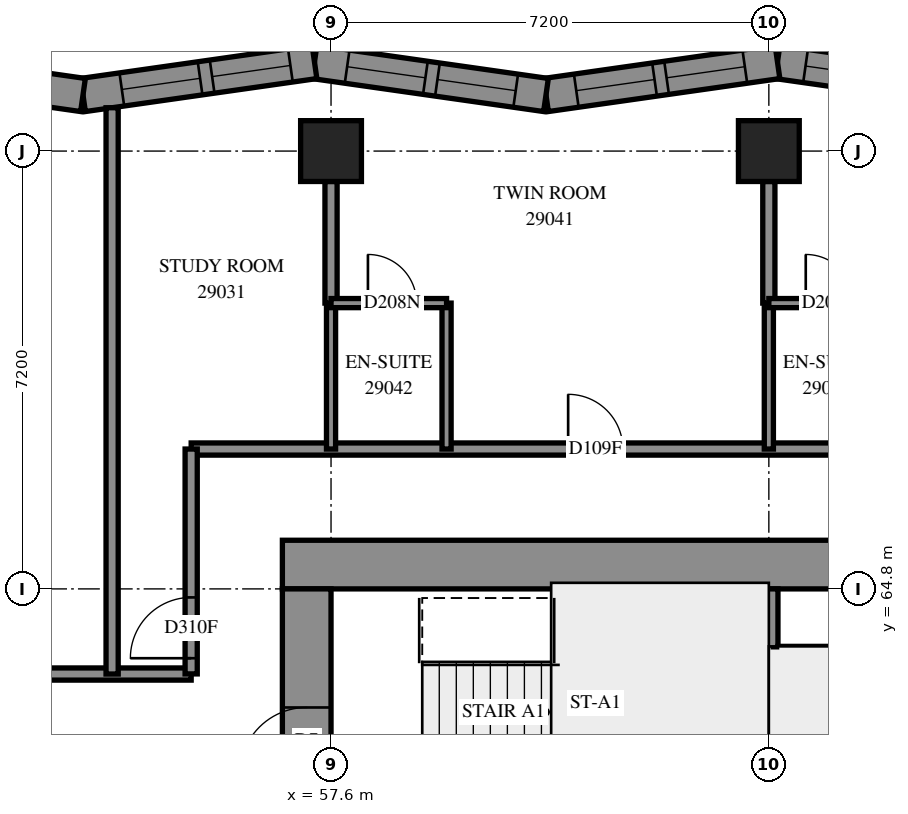
"""IFC4 building model, lengths in metres.
Left out: names, types, materials, properties, quantities, classifications, styles, units other than length and angle.
Written with IfcOpenShell. Run it as: python <this file> out.ifc"""

import sys

from ifc_helpers import new_model, si_unit, direction, frame, frame_2d, origin, origin_2d, place, context, subcontext, project, spatial, polyline, rectangle, outline, extrude, element, fill, save


model = new_model("IFC4")
c1 = context("Model", 3, precision=1e-05, world=origin(), true_north=direction((0.0, 1.0)))
c2 = subcontext(c1, "Body", "Model", "MODEL_VIEW")
j1 = project(units=[si_unit("LENGTHUNIT", "METRE"), si_unit("PLANEANGLEUNIT", "RADIAN")], contexts=[c1])
p1 = place(None, origin())
s1 = spatial("IfcSite", under=j1, at=p1, CompositionType="ELEMENT")
p2 = place(p1, origin())
s2 = spatial("IfcBuilding", under=s1, at=p2, CompositionType="ELEMENT")
p3 = place(p2, frame((0.0, 0.0, 108.4)))
s3 = spatial("IfcBuildingStorey", under=s2, at=p3, CompositionType="ELEMENT", Elevation=108.4)
for number, where, z_axis, x_axis in (
    (1, (57.6, 72.0, 0.0), (0.0, 0.0, 1.0), (1.0, 0.0, 0.0)),
    (2, (64.8, 72.0, 0.0), (0.0, 0.0, 1.0), (1.0, 0.0, 0.0)),
):
    element("IfcColumn", number, at=place(p3, frame(where, z_axis=z_axis, x_axis=x_axis)), inside=s3, PredefinedType="COLUMN", context=c2, shape_type="SweptSolid", body=[
        extrude(rectangle(XDim=1.0, YDim=1.0, at=origin_2d()), origin(), (0.0, 0.0, 1.0), 3.1),
    ])
p4 = place(p3, frame((56.8, 65.2, -0.3), z_axis=(0.0, 0.0, 1.0), x_axis=(1.0, 0.0, 0.0)))
e3 = element("IfcWall", 3, at=p4, inside=s3, PredefinedType="SHEAR", context=c2, shape_type="SweptSolid", body=[
    extrude(rectangle(XDim=16.0, YDim=0.8, at=frame_2d((8.0, 0.0))), origin(), (0.0, 0.0, 1.0), 2.7),
])
p5 = place(p4, frame((10.8, 0.0, 0.3)))
e4 = element("IfcOpeningElement", 4, at=p5, cuts=e3, PredefinedType="OPENING", context=c2, shape_type="SweptSolid", body=[
    extrude(rectangle(XDim=0.8, YDim=2.1, at=frame_2d((0.4, 1.05))), frame((0.0, 0.41, 0.0), z_axis=(0.0, -1.0, 0.0), x_axis=(1.0, 0.0, 0.0)), (0.0, 0.0, 1.0), 0.82),
])
p6 = place(p3, frame((57.2, 50.4, -0.3), z_axis=(0.0, 0.0, 1.0), x_axis=(0.0, 1.0, 0.0)))
e5 = element("IfcWall", 5, at=p6, inside=s3, PredefinedType="SHEAR", context=c2, shape_type="SweptSolid", body=[
    extrude(rectangle(XDim=14.4, YDim=0.8, at=frame_2d((7.2, 0.0))), origin(), (0.0, 0.0, 1.0), 2.7),
])
p7 = place(p6, frame((4.55, 0.0, 0.3)))
e6 = element("IfcOpeningElement", 6, at=p7, cuts=e5, PredefinedType="OPENING", context=c2, shape_type="SweptSolid", body=[
    extrude(rectangle(XDim=1.1, YDim=2.1, at=frame_2d((0.55, 1.05))), frame((0.0, 0.41, 0.0), z_axis=(0.0, -1.0, 0.0), x_axis=(1.0, 0.0, 0.0)), (0.0, 0.0, 1.0), 0.82),
])
p8 = place(p6, frame((11.35, 0.0, 0.3)))
e7 = element("IfcOpeningElement", 7, at=p8, cuts=e5, PredefinedType="OPENING", context=c2, shape_type="SweptSolid", body=[
    extrude(rectangle(XDim=1.1, YDim=2.1, at=frame_2d((0.55, 1.05))), frame((0.0, 0.41, 0.0), z_axis=(0.0, -1.0, 0.0), x_axis=(1.0, 0.0, 0.0)), (0.0, 0.0, 1.0), 0.82),
])
p9 = place(p3, frame((64.8, 60.6, 0.0), z_axis=(0.0, 0.0, 1.0), x_axis=(0.0, 1.0, 0.0)))
e8 = element("IfcWall", 8, at=p9, inside=s3, PredefinedType="SOLIDWALL", context=c2, shape_type="SweptSolid", body=[
    extrude(rectangle(XDim=4.2, YDim=0.3, at=frame_2d((2.1, 0.0))), origin(), (0.0, 0.0, 1.0), 3.1),
])
p10 = place(p3, frame((68.749, 72.922, 0.0), z_axis=(0.0, 0.0, 1.0), x_axis=(-0.990016994, 0.1409480459, 0.0)))
e9 = element("IfcWall", 9, at=p10, inside=s3, PredefinedType="SOLIDWALL", context=c2, shape_type="SweptSolid", body=[
    extrude(outline(polyline([(0.039, -0.275), (3.885, -0.275), (3.806, 0.275), (-0.039, 0.275), (0.039, -0.275)])), origin(), (0.0, 0.0, 1.0), 3.1),
])
p11 = place(p10, frame((0.579, 0.0, 0.5)))
e10 = element("IfcOpeningElement", 10, at=p11, cuts=e9, PredefinedType="OPENING", context=c2, shape_type="SweptSolid", body=[
    extrude(rectangle(XDim=1.3, YDim=2.45, at=frame_2d((0.65, 1.225))), frame((0.0, 0.285, 0.0), z_axis=(0.0, -1.0, 0.0), x_axis=(1.0, 0.0, 0.0)), (0.0, 0.0, 1.0), 0.57),
])
p12 = place(p10, frame((2.079, 0.0, 0.5)))
e11 = element("IfcOpeningElement", 11, at=p12, cuts=e9, PredefinedType="OPENING", context=c2, shape_type="SweptSolid", body=[
    extrude(rectangle(XDim=1.3, YDim=2.45, at=frame_2d((0.65, 1.225))), frame((0.0, 0.285, 0.0), z_axis=(0.0, -1.0, 0.0), x_axis=(1.0, 0.0, 0.0)), (0.0, 0.0, 1.0), 0.57),
])
p13 = place(p3, frame((64.942, 73.464, 0.0), z_axis=(0.0, 0.0, 1.0), x_axis=(-0.990016994, -0.1409480459, 0.0)))
e12 = element("IfcWall", 12, at=p13, inside=s3, PredefinedType="SOLIDWALL", context=c2, shape_type="SweptSolid", body=[
    extrude(outline(polyline([(-0.039, -0.275), (3.806, -0.275), (3.885, 0.275), (0.039, 0.275), (-0.039, -0.275)])), origin(), (0.0, 0.0, 1.0), 3.1),
])
p14 = place(p13, frame((0.542, 0.0, 0.5)))
e13 = element("IfcOpeningElement", 13, at=p14, cuts=e12, PredefinedType="OPENING", context=c2, shape_type="SweptSolid", body=[
    extrude(rectangle(XDim=1.3, YDim=2.45, at=frame_2d((0.65, 1.225))), frame((0.0, 0.285, 0.0), z_axis=(0.0, -1.0, 0.0), x_axis=(1.0, 0.0, 0.0)), (0.0, 0.0, 1.0), 0.57),
])
p15 = place(p13, frame((2.042, 0.0, 0.5)))
e14 = element("IfcOpeningElement", 14, at=p15, cuts=e12, PredefinedType="OPENING", context=c2, shape_type="SweptSolid", body=[
    extrude(rectangle(XDim=1.3, YDim=2.45, at=frame_2d((0.65, 1.225))), frame((0.0, 0.285, 0.0), z_axis=(0.0, -1.0, 0.0), x_axis=(1.0, 0.0, 0.0)), (0.0, 0.0, 1.0), 0.57),
])
p16 = place(p3, frame((61.135, 72.922, 0.0), z_axis=(0.0, 0.0, 1.0), x_axis=(-0.990016994, 0.1409480459, 0.0)))
e15 = element("IfcWall", 15, at=p16, inside=s3, PredefinedType="SOLIDWALL", context=c2, shape_type="SweptSolid", body=[
    extrude(outline(polyline([(0.039, -0.275), (3.885, -0.275), (3.806, 0.275), (-0.039, 0.275), (0.039, -0.275)])), origin(), (0.0, 0.0, 1.0), 3.1),
])
p17 = place(p16, frame((0.503, 0.0, 0.5)))
e16 = element("IfcOpeningElement", 16, at=p17, cuts=e15, PredefinedType="OPENING", context=c2, shape_type="SweptSolid", body=[
    extrude(rectangle(XDim=1.3, YDim=2.45, at=frame_2d((0.65, 1.225))), frame((0.0, 0.285, 0.0), z_axis=(0.0, -1.0, 0.0), x_axis=(1.0, 0.0, 0.0)), (0.0, 0.0, 1.0), 0.57),
])
p18 = place(p16, frame((2.003, 0.0, 0.5)))
e17 = element("IfcOpeningElement", 17, at=p18, cuts=e15, PredefinedType="OPENING", context=c2, shape_type="SweptSolid", body=[
    extrude(rectangle(XDim=1.3, YDim=2.45, at=frame_2d((0.65, 1.225))), frame((0.0, 0.285, 0.0), z_axis=(0.0, -1.0, 0.0), x_axis=(1.0, 0.0, 0.0)), (0.0, 0.0, 1.0), 0.57),
])
p19 = place(p3, frame((57.328, 73.464, 0.0), z_axis=(0.0, 0.0, 1.0), x_axis=(-0.990016994, -0.1409480459, 0.0)))
e18 = element("IfcWall", 18, at=p19, inside=s3, PredefinedType="SOLIDWALL", context=c2, shape_type="SweptSolid", body=[
    extrude(outline(polyline([(-0.039, -0.275), (3.806, -0.275), (3.885, 0.275), (0.039, 0.275), (-0.039, -0.275)])), origin(), (0.0, 0.0, 1.0), 3.1),
])
p20 = place(p19, frame((0.4, 0.0, 0.5)))
e19 = element("IfcOpeningElement", 19, at=p20, cuts=e18, PredefinedType="OPENING", context=c2, shape_type="SweptSolid", body=[
    extrude(rectangle(XDim=1.3, YDim=2.45, at=frame_2d((0.65, 1.225))), frame((0.0, 0.285, 0.0), z_axis=(0.0, -1.0, 0.0), x_axis=(1.0, 0.0, 0.0)), (0.0, 0.0, 1.0), 0.57),
])
p21 = place(p19, frame((1.9, 0.0, 0.5)))
e20 = element("IfcOpeningElement", 20, at=p21, cuts=e18, PredefinedType="OPENING", context=c2, shape_type="SweptSolid", body=[
    extrude(rectangle(XDim=1.3, YDim=2.45, at=frame_2d((0.65, 1.225))), frame((0.0, 0.285, 0.0), z_axis=(0.0, -1.0, 0.0), x_axis=(1.0, 0.0, 0.0)), (0.0, 0.0, 1.0), 0.57),
])
p22 = place(p3, frame((53.521, 72.922, 0.0), z_axis=(0.0, 0.0, 1.0), x_axis=(-0.990016994, 0.1409480459, 0.0)))
e21 = element("IfcWall", 21, at=p22, inside=s3, PredefinedType="SOLIDWALL", context=c2, shape_type="SweptSolid", body=[
    extrude(outline(polyline([(0.039, -0.275), (3.885, -0.275), (3.806, 0.275), (-0.039, 0.275), (0.039, -0.275)])), origin(), (0.0, 0.0, 1.0), 3.1),
])
p23 = place(p22, frame((1.076, 0.0, 0.5)))
e22 = element("IfcOpeningElement", 22, at=p23, cuts=e21, PredefinedType="OPENING", context=c2, shape_type="SweptSolid", body=[
    extrude(rectangle(XDim=1.2, YDim=2.45, at=frame_2d((0.6, 1.225))), frame((0.0, 0.285, 0.0), z_axis=(0.0, -1.0, 0.0), x_axis=(1.0, 0.0, 0.0)), (0.0, 0.0, 1.0), 0.57),
])
p24 = place(p3, frame((64.95, 63.78, 0.0), z_axis=(0.0, 0.0, 1.0), x_axis=(1.0, 0.0, 0.0)))
e23 = element("IfcWall", 23, at=p24, inside=s3, PredefinedType="PARTITIONING", context=c2, shape_type="SweptSolid", body=[
    extrude(rectangle(XDim=5.95, YDim=0.15, at=frame_2d((2.975, 0.0))), origin(), (0.0, 0.0, 1.0), 3.1),
])
p25 = place(p3, frame((33.4, 63.4, 0.0), z_axis=(0.0, 0.0, 1.0), x_axis=(1.0, 0.0, 0.0)))
e24 = element("IfcWall", 24, at=p25, inside=s3, PredefinedType="PARTITIONING", context=c2, shape_type="SweptSolid", body=[
    extrude(rectangle(XDim=21.9, YDim=0.2, at=frame_2d((10.95, 0.0))), origin(), (0.0, 0.0, 1.0), 3.1),
])
p26 = place(p25, frame((3.152, 0.0, 0.0)))
e25 = element("IfcOpeningElement", 25, at=p26, cuts=e24, PredefinedType="OPENING", context=c2, shape_type="SweptSolid", body=[
    extrude(rectangle(XDim=0.9, YDim=2.1, at=frame_2d((0.45, 1.05))), frame((0.0, 0.11, 0.0), z_axis=(0.0, -1.0, 0.0), x_axis=(1.0, 0.0, 0.0)), (0.0, 0.0, 1.0), 0.22),
])
p27 = place(p25, frame((8.161, 0.0, 0.0)))
e26 = element("IfcOpeningElement", 26, at=p27, cuts=e24, PredefinedType="OPENING", context=c2, shape_type="SweptSolid", body=[
    extrude(rectangle(XDim=0.9, YDim=2.1, at=frame_2d((0.45, 1.05))), frame((0.0, 0.11, 0.0), z_axis=(0.0, -1.0, 0.0), x_axis=(1.0, 0.0, 0.0)), (0.0, 0.0, 1.0), 0.22),
])
p28 = place(p25, frame((15.471, 0.0, 0.0)))
e27 = element("IfcOpeningElement", 27, at=p28, cuts=e24, PredefinedType="OPENING", context=c2, shape_type="SweptSolid", body=[
    extrude(rectangle(XDim=1.0, YDim=2.1, at=frame_2d((0.5, 1.05))), frame((0.0, 0.11, 0.0), z_axis=(0.0, -1.0, 0.0), x_axis=(1.0, 0.0, 0.0)), (0.0, 0.0, 1.0), 0.22),
])
p29 = place(p3, frame((55.3, 67.1, 0.0), z_axis=(0.0, 0.0, 1.0), x_axis=(1.0, 0.0, 0.0)))
e28 = element("IfcWall", 28, at=p29, inside=s3, PredefinedType="PARTITIONING", context=c2, shape_type="SweptSolid", body=[
    extrude(rectangle(XDim=19.0, YDim=0.2, at=frame_2d((9.5, 0.0))), origin(), (0.0, 0.0, 1.0), 3.1),
])
p30 = place(p29, frame((6.199, 0.0, 0.0)))
e29 = element("IfcOpeningElement", 29, at=p30, cuts=e28, PredefinedType="OPENING", context=c2, shape_type="SweptSolid", body=[
    extrude(rectangle(XDim=0.9, YDim=2.1, at=frame_2d((0.45, 1.05))), frame((0.0, 0.11, 0.0), z_axis=(0.0, -1.0, 0.0), x_axis=(1.0, 0.0, 0.0)), (0.0, 0.0, 1.0), 0.22),
])
p31 = place(p29, frame((13.399, 0.0, 0.0)))
e30 = element("IfcOpeningElement", 30, at=p31, cuts=e28, PredefinedType="OPENING", context=c2, shape_type="SweptSolid", body=[
    extrude(rectangle(XDim=0.9, YDim=2.1, at=frame_2d((0.45, 1.05))), frame((0.0, 0.11, 0.0), z_axis=(0.0, -1.0, 0.0), x_axis=(1.0, 0.0, 0.0)), (0.0, 0.0, 1.0), 0.22),
])
p32 = place(p3, frame((54.0, 63.4, 0.0), z_axis=(0.0, 0.0, 1.0), x_axis=(0.0, 1.0, 0.0)))
e31 = element("IfcWall", 31, at=p32, inside=s3, PredefinedType="PARTITIONING", context=c2, shape_type="SweptSolid", body=[
    extrude(rectangle(XDim=9.313, YDim=0.2, at=frame_2d((4.656, 0.0))), origin(), (0.0, 0.0, 1.0), 3.1),
])
p33 = place(p3, frame((55.3, 63.402, 0.0), z_axis=(0.0, 0.0, 1.0), x_axis=(0.0, 1.0, 0.0)))
e32 = element("IfcWall", 32, at=p33, inside=s3, PredefinedType="PARTITIONING", context=c2, shape_type="SweptSolid", body=[
    extrude(rectangle(XDim=3.698, YDim=0.2, at=frame_2d((1.849, 0.0))), origin(), (0.0, 0.0, 1.0), 3.1),
])
p34 = place(p33, frame((0.258, 0.0, 0.0)))
e33 = element("IfcOpeningElement", 33, at=p34, cuts=e32, PredefinedType="OPENING", context=c2, shape_type="SweptSolid", body=[
    extrude(rectangle(XDim=1.0, YDim=2.1, at=frame_2d((0.5, 1.05))), frame((0.0, 0.11, 0.0), z_axis=(0.0, -1.0, 0.0), x_axis=(1.0, 0.0, 0.0)), (0.0, 0.0, 1.0), 0.22),
])
for number, where, z_axis, x_axis in (
    (34, (59.5, 67.1, 0.0), (0.0, 0.0, 1.0), (0.0, 1.0, 0.0)),
    (35, (57.6, 67.1, 0.0), (0.0, 0.0, 1.0), (0.0, 1.0, 0.0)),
    (36, (64.8, 67.1, 0.0), (0.0, 0.0, 1.0), (0.0, 1.0, 0.0)),
):
    element("IfcWall", number, at=place(p3, frame(where, z_axis=z_axis, x_axis=x_axis)), inside=s3, PredefinedType="PARTITIONING", context=c2, shape_type="SweptSolid", body=[
        extrude(rectangle(XDim=2.4, YDim=0.15, at=frame_2d((1.2, 0.0))), origin(), (0.0, 0.0, 1.0), 3.1),
    ])
for number, where, z_axis, x_axis in (
    (37, (57.6, 69.5, 0.0), (0.0, 0.0, 1.0), (0.0, 1.0, 0.0)),
    (38, (64.8, 69.5, 0.0), (0.0, 0.0, 1.0), (0.0, 1.0, 0.0)),
):
    element("IfcWall", number, at=place(p3, frame(where, z_axis=z_axis, x_axis=x_axis)), inside=s3, PredefinedType="PARTITIONING", context=c2, shape_type="SweptSolid", body=[
        extrude(rectangle(XDim=2.0, YDim=0.2, at=frame_2d((1.0, 0.0))), origin(), (0.0, 0.0, 1.0), 3.1),
    ])
p35 = place(p3, frame((64.8, 69.5, 0.0), z_axis=(0.0, 0.0, 1.0), x_axis=(1.0, 0.0, 0.0)))
e39 = element("IfcWall", 39, at=p35, inside=s3, PredefinedType="PARTITIONING", context=c2, shape_type="SweptSolid", body=[
    extrude(rectangle(XDim=1.9, YDim=0.15, at=frame_2d((0.95, 0.0))), origin(), (0.0, 0.0, 1.0), 3.1),
])
p36 = place(p35, frame((0.607, 0.0, 0.0)))
e40 = element("IfcOpeningElement", 40, at=p36, cuts=e39, PredefinedType="OPENING", context=c2, shape_type="SweptSolid", body=[
    extrude(rectangle(XDim=0.8, YDim=2.1, at=frame_2d((0.4, 1.05))), frame((0.0, 0.085, 0.0), z_axis=(0.0, -1.0, 0.0), x_axis=(1.0, 0.0, 0.0)), (0.0, 0.0, 1.0), 0.17),
])
p37 = place(p3, frame((57.6, 69.5, 0.0), z_axis=(0.0, 0.0, 1.0), x_axis=(1.0, 0.0, 0.0)))
e41 = element("IfcWall", 41, at=p37, inside=s3, PredefinedType="PARTITIONING", context=c2, shape_type="SweptSolid", body=[
    extrude(rectangle(XDim=1.9, YDim=0.15, at=frame_2d((0.95, 0.0))), origin(), (0.0, 0.0, 1.0), 3.1),
])
p38 = place(p37, frame((0.607, 0.0, 0.0)))
e42 = element("IfcOpeningElement", 42, at=p38, cuts=e41, PredefinedType="OPENING", context=c2, shape_type="SweptSolid", body=[
    extrude(rectangle(XDim=0.8, YDim=2.1, at=frame_2d((0.4, 1.05))), frame((0.0, 0.085, 0.0), z_axis=(0.0, -1.0, 0.0), x_axis=(1.0, 0.0, 0.0)), (0.0, 0.0, 1.0), 0.17),
])
p39 = place(p12, origin())
e43 = element("IfcWindow", 43, at=p39, inside=s3, PartitioningType="SINGLE_PANEL", PredefinedType="WINDOW", context=c2, shape_type="SweptSolid", body=[
    extrude(rectangle(XDim=1.3, YDim=2.45, at=frame_2d((0.65, 1.225))), frame((0.0, 0.155, 0.0), z_axis=(0.0, -1.0, 0.0), x_axis=(1.0, 0.0, 0.0)), (0.0, 0.0, 1.0), 0.06),
])
fill(e11, e43)
p40 = place(p14, origin())
e44 = element("IfcWindow", 44, at=p40, inside=s3, PartitioningType="SINGLE_PANEL", PredefinedType="WINDOW", context=c2, shape_type="SweptSolid", body=[
    extrude(rectangle(XDim=1.3, YDim=2.45, at=frame_2d((0.65, 1.225))), frame((0.0, 0.155, 0.0), z_axis=(0.0, -1.0, 0.0), x_axis=(1.0, 0.0, 0.0)), (0.0, 0.0, 1.0), 0.06),
])
fill(e13, e44)
p41 = place(p15, origin())
e45 = element("IfcWindow", 45, at=p41, inside=s3, PartitioningType="SINGLE_PANEL", PredefinedType="WINDOW", context=c2, shape_type="SweptSolid", body=[
    extrude(rectangle(XDim=1.3, YDim=2.45, at=frame_2d((0.65, 1.225))), frame((0.0, 0.155, 0.0), z_axis=(0.0, -1.0, 0.0), x_axis=(1.0, 0.0, 0.0)), (0.0, 0.0, 1.0), 0.06),
])
fill(e14, e45)
p42 = place(p17, origin())
e46 = element("IfcWindow", 46, at=p42, inside=s3, PartitioningType="SINGLE_PANEL", PredefinedType="WINDOW", context=c2, shape_type="SweptSolid", body=[
    extrude(rectangle(XDim=1.3, YDim=2.45, at=frame_2d((0.65, 1.225))), frame((0.0, 0.155, 0.0), z_axis=(0.0, -1.0, 0.0), x_axis=(1.0, 0.0, 0.0)), (0.0, 0.0, 1.0), 0.06),
])
fill(e16, e46)
p43 = place(p18, origin())
e47 = element("IfcWindow", 47, at=p43, inside=s3, PartitioningType="SINGLE_PANEL", PredefinedType="WINDOW", context=c2, shape_type="SweptSolid", body=[
    extrude(rectangle(XDim=1.3, YDim=2.45, at=frame_2d((0.65, 1.225))), frame((0.0, 0.155, 0.0), z_axis=(0.0, -1.0, 0.0), x_axis=(1.0, 0.0, 0.0)), (0.0, 0.0, 1.0), 0.06),
])
fill(e17, e47)
p44 = place(p20, origin())
e48 = element("IfcWindow", 48, at=p44, inside=s3, PartitioningType="SINGLE_PANEL", PredefinedType="WINDOW", context=c2, shape_type="SweptSolid", body=[
    extrude(rectangle(XDim=1.3, YDim=2.45, at=frame_2d((0.65, 1.225))), frame((0.0, 0.155, 0.0), z_axis=(0.0, -1.0, 0.0), x_axis=(1.0, 0.0, 0.0)), (0.0, 0.0, 1.0), 0.06),
])
fill(e19, e48)
p45 = place(p21, origin())
e49 = element("IfcWindow", 49, at=p45, inside=s3, PartitioningType="SINGLE_PANEL", PredefinedType="WINDOW", context=c2, shape_type="SweptSolid", body=[
    extrude(rectangle(XDim=1.3, YDim=2.45, at=frame_2d((0.65, 1.225))), frame((0.0, 0.155, 0.0), z_axis=(0.0, -1.0, 0.0), x_axis=(1.0, 0.0, 0.0)), (0.0, 0.0, 1.0), 0.06),
])
fill(e20, e49)
p46 = place(p8, origin())
e50 = element("IfcDoor", 50, at=p46, inside=s3, OperationType="SINGLE_SWING_LEFT", PredefinedType="DOOR", context=c2, shape_type="SweptSolid", body=[
    extrude(rectangle(XDim=1.1, YDim=2.1, at=frame_2d((0.55, 1.05))), frame((0.0, 0.025, 0.0), z_axis=(0.0, -1.0, 0.0), x_axis=(1.0, 0.0, 0.0)), (0.0, 0.0, 1.0), 0.05),
])
fill(e7, e50)
p47 = place(p34, origin())
e51 = element("IfcDoor", 51, at=p47, inside=s3, OperationType="SINGLE_SWING_LEFT", PredefinedType="DOOR", context=c2, shape_type="SweptSolid", body=[
    extrude(rectangle(XDim=1.0, YDim=2.1, at=frame_2d((0.5, 1.05))), frame((0.0, 0.025, 0.0), z_axis=(0.0, -1.0, 0.0), x_axis=(1.0, 0.0, 0.0)), (0.0, 0.0, 1.0), 0.05),
])
fill(e33, e51)
p48 = place(p30, origin())
e52 = element("IfcDoor", 52, at=p48, inside=s3, OperationType="SINGLE_SWING_RIGHT", PredefinedType="DOOR", context=c2, shape_type="SweptSolid", body=[
    extrude(rectangle(XDim=0.9, YDim=2.1, at=frame_2d((0.45, 1.05))), frame((0.0, 0.025, 0.0), z_axis=(0.0, -1.0, 0.0), x_axis=(1.0, 0.0, 0.0)), (0.0, 0.0, 1.0), 0.05),
])
fill(e29, e52)
p49 = place(p38, origin())
e53 = element("IfcDoor", 53, at=p49, inside=s3, OperationType="SINGLE_SWING_RIGHT", PredefinedType="DOOR", context=c2, shape_type="SweptSolid", body=[
    extrude(rectangle(XDim=0.8, YDim=2.1, at=frame_2d((0.4, 1.05))), frame((0.0, 0.025, 0.0), z_axis=(0.0, -1.0, 0.0), x_axis=(1.0, 0.0, 0.0)), (0.0, 0.0, 1.0), 0.05),
])
fill(e42, e53)
p50 = place(p36, origin())
e54 = element("IfcDoor", 54, at=p50, inside=s3, OperationType="SINGLE_SWING_RIGHT", PredefinedType="DOOR", context=c2, shape_type="SweptSolid", body=[
    extrude(rectangle(XDim=0.8, YDim=2.1, at=frame_2d((0.4, 1.05))), frame((0.0, 0.025, 0.0), z_axis=(0.0, -1.0, 0.0), x_axis=(1.0, 0.0, 0.0)), (0.0, 0.0, 1.0), 0.05),
])
fill(e40, e54)
save(model, sys.argv[1])
